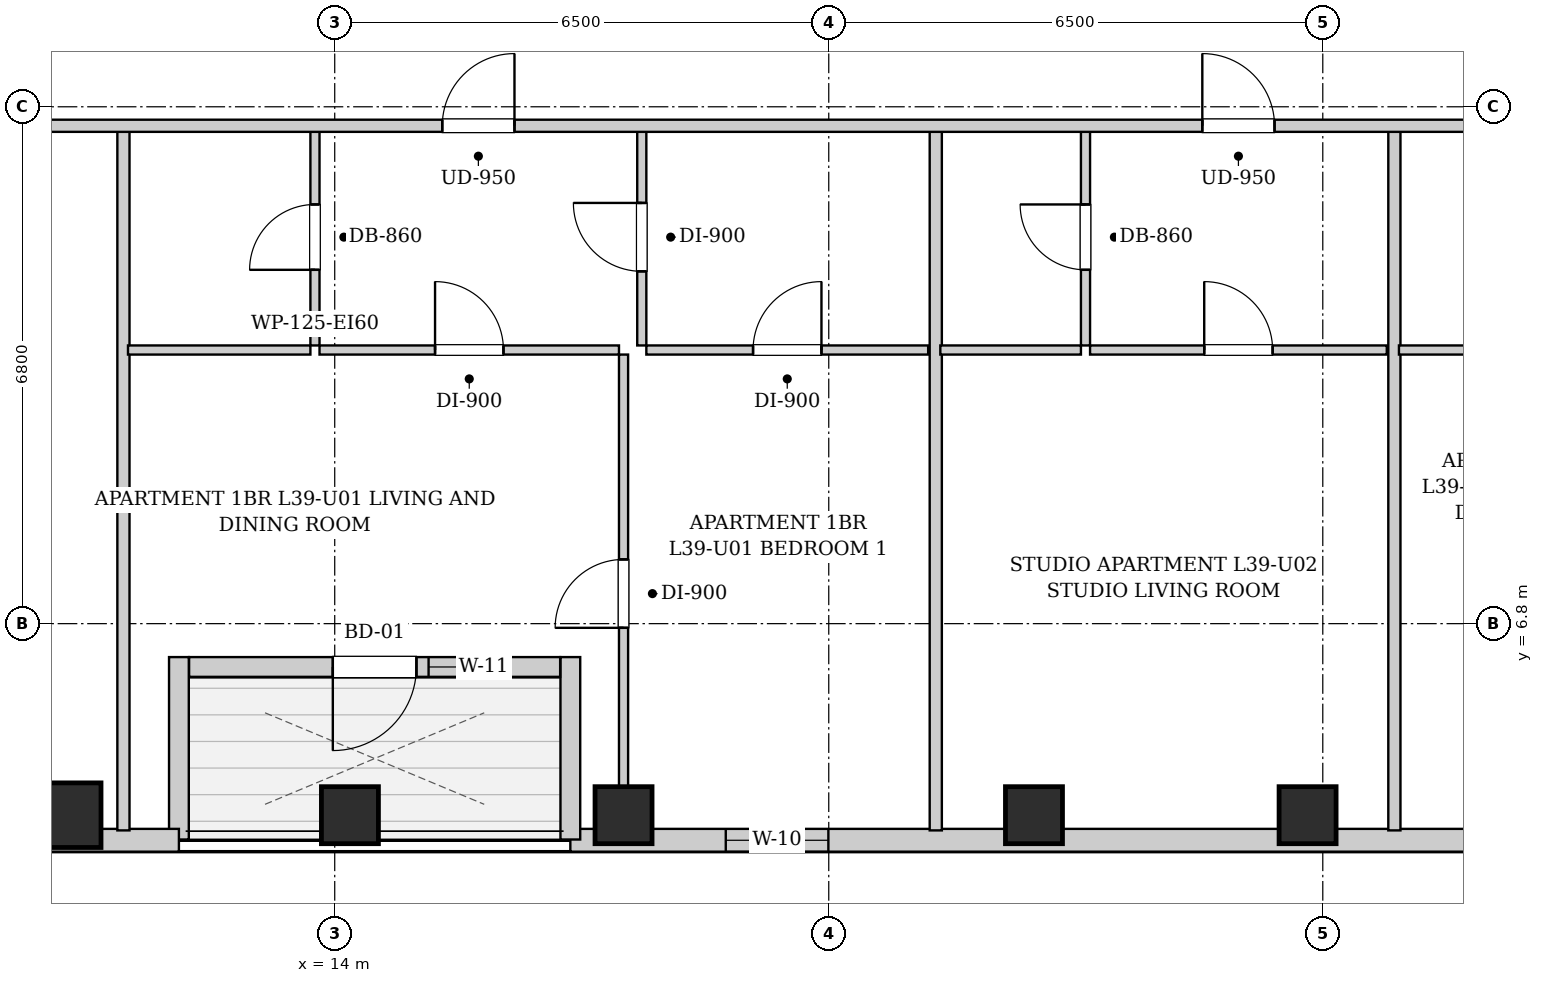
"""IFC4 building model, lengths in metres.
Left out: names, types, materials, properties, quantities, classifications, styles, units other than length and angle.
Written with IfcOpenShell. Run it as: python <this file> out.ifc"""

import sys

from ifc_helpers import new_model, si_unit, direction, frame, frame_2d, origin, origin_2d, place, context, subcontext, project, spatial, rectangle, extrude, element, fill, save


model = new_model("IFC4")
c1 = context("Model", 3, precision=1e-05, world=origin(), true_north=direction((0.0, 1.0)))
c2 = subcontext(c1, "Body", "Model", "MODEL_VIEW")
j1 = project(units=[si_unit("LENGTHUNIT", "METRE"), si_unit("PLANEANGLEUNIT", "RADIAN")], contexts=[c1])
p1 = place(None, origin())
s1 = spatial("IfcSite", under=j1, at=p1, CompositionType="ELEMENT")
p2 = place(p1, origin())
s2 = spatial("IfcBuilding", under=s1, at=p2, CompositionType="ELEMENT")
p3 = place(p2, frame((0.0, 0.0, 137.4)))
s3 = spatial("IfcBuildingStorey", under=s2, at=p3, CompositionType="ELEMENT", Elevation=137.4)
p4 = place(p3, frame((10.5, 4.28, 0.0), z_axis=(0.0, 0.0, 1.0), x_axis=(1.0, 0.0, 0.0)))
e1 = element("IfcColumn", 1, at=p4, inside=s3, PredefinedType="COLUMN", context=c2, shape_type="SweptSolid", body=[
    extrude(rectangle(XDim=0.85, YDim=0.85, at=origin_2d()), origin(), (0.0, 0.0, 1.0), 3.25),
])
for number, where, z_axis, x_axis in (
    (2, (14.2, 4.28, 0.0), (0.0, 0.0, 1.0), (1.0, 0.0, 0.0)),
    (3, (17.8, 4.28, 0.0), (0.0, 0.0, 1.0), (1.0, 0.0, 0.0)),
    (4, (23.2, 4.28, 0.0), (0.0, 0.0, 1.0), (1.0, 0.0, 0.0)),
    (5, (26.8, 4.28, 0.0), (0.0, 0.0, 1.0), (1.0, 0.0, 0.0)),
):
    element("IfcColumn", number, at=place(p3, frame(where, z_axis=z_axis, x_axis=x_axis)), inside=s3, PredefinedType="COLUMN", context=c2, shape_type="SweptSolid", body=[
        extrude(rectangle(XDim=0.75, YDim=0.75, at=origin_2d()), origin(), (0.0, 0.0, 1.0), 3.25),
    ])
p5 = place(p3, frame((37.8, 3.95, 0.0), z_axis=(0.0, 0.0, 1.0), x_axis=(-1.0, 0.0, 0.0)))
e6 = element("IfcWall", 6, at=p5, inside=s3, PredefinedType="SOLIDWALL", context=c2, shape_type="SweptSolid", body=[
    extrude(rectangle(XDim=20.7, YDim=0.3, at=frame_2d((10.35, 0.0))), origin(), (0.0, 0.0, 1.0), 2.99),
])
p6 = place(p5, frame((17.305, 0.0, 0.55)))
e7 = element("IfcOpeningElement", 7, at=p6, cuts=e6, PredefinedType="OPENING", context=c2, shape_type="SweptSolid", body=[
    extrude(rectangle(XDim=1.35, YDim=1.2, at=frame_2d((0.675, 0.6))), frame((0.0, 0.16, 0.0), z_axis=(0.0, -1.0, 0.0), x_axis=(1.0, 0.0, 0.0)), (0.0, 0.0, 1.0), 0.32),
])
p7 = place(p5, frame((7.106, 0.0, 0.55)))
e8 = element("IfcOpeningElement", 8, at=p7, cuts=e6, PredefinedType="OPENING", context=c2, shape_type="SweptSolid", body=[
    extrude(rectangle(XDim=1.35, YDim=1.2, at=frame_2d((0.675, 0.6))), frame((0.0, 0.16, 0.0), z_axis=(0.0, -1.0, 0.0), x_axis=(1.0, 0.0, 0.0)), (0.0, 0.0, 1.0), 0.32),
])
p8 = place(p5, frame((2.715, 0.0, 0.55)))
e9 = element("IfcOpeningElement", 9, at=p8, cuts=e6, PredefinedType="OPENING", context=c2, shape_type="SweptSolid", body=[
    extrude(rectangle(XDim=1.35, YDim=1.2, at=frame_2d((0.675, 0.6))), frame((0.0, 0.16, 0.0), z_axis=(0.0, -1.0, 0.0), x_axis=(1.0, 0.0, 0.0)), (0.0, 0.0, 1.0), 0.32),
])
p9 = place(p3, frame((17.1, 3.96, 0.0), z_axis=(0.0, 0.0, 1.0), x_axis=(0.0, 1.0, 0.0)))
e10 = element("IfcWall", 10, at=p9, inside=s3, PredefinedType="SOLIDWALL", context=c2, shape_type="SweptSolid", body=[
    extrude(rectangle(XDim=2.4, YDim=0.26, at=frame_2d((1.2, 0.0))), origin(), (0.0, 0.0, 1.0), 2.99),
])
p10 = place(p3, frame((16.966, 6.23, 0.0), z_axis=(0.0, 0.0, 1.0), x_axis=(-1.0, 0.0, 0.0)))
e11 = element("IfcWall", 11, at=p10, inside=s3, PredefinedType="SOLIDWALL", context=c2, shape_type="SweptSolid", body=[
    extrude(rectangle(XDim=4.882, YDim=0.26, at=frame_2d((2.441, 0.0))), origin(), (0.0, 0.0, 1.0), 2.99),
])
p11 = place(p10, frame((1.891, 0.0, 0.0)))
e12 = element("IfcOpeningElement", 12, at=p11, cuts=e11, PredefinedType="OPENING", context=c2, shape_type="SweptSolid", body=[
    extrude(rectangle(XDim=1.1, YDim=2.0, at=frame_2d((0.55, 1.0))), frame((0.0, 0.14, 0.0), z_axis=(0.0, -1.0, 0.0), x_axis=(1.0, 0.0, 0.0)), (0.0, 0.0, 1.0), 0.28),
])
p12 = place(p10, frame((0.881, 0.0, 0.55)))
e13 = element("IfcOpeningElement", 13, at=p12, cuts=e11, PredefinedType="OPENING", context=c2, shape_type="SweptSolid", body=[
    extrude(rectangle(XDim=0.85, YDim=1.2, at=frame_2d((0.425, 0.6))), frame((0.0, 0.14, 0.0), z_axis=(0.0, -1.0, 0.0), x_axis=(1.0, 0.0, 0.0)), (0.0, 0.0, 1.0), 0.28),
])
p13 = place(p3, frame((11.95, 6.36, 0.0), z_axis=(0.0, 0.0, 1.0), x_axis=(0.0, -1.0, 0.0)))
e14 = element("IfcWall", 14, at=p13, inside=s3, PredefinedType="SOLIDWALL", context=c2, shape_type="SweptSolid", body=[
    extrude(rectangle(XDim=2.4, YDim=0.26, at=frame_2d((1.2, 0.0))), origin(), (0.0, 0.0, 1.0), 2.99),
])
p14 = place(p3, frame((11.95, 3.95, 0.0), z_axis=(0.0, 0.0, 1.0), x_axis=(-1.0, 0.0, 0.0)))
e15 = element("IfcWall", 15, at=p14, inside=s3, PredefinedType="SOLIDWALL", context=c2, shape_type="SweptSolid", body=[
    extrude(rectangle(XDim=1.95, YDim=0.3, at=frame_2d((0.975, 0.0))), origin(), (0.0, 0.0, 1.0), 2.99),
])
p15 = place(p3, frame((11.22, 4.08, 0.0), z_axis=(0.0, 0.0, 1.0), x_axis=(0.0, 1.0, 0.0)))
e16 = element("IfcWall", 16, at=p15, inside=s3, PredefinedType="PARTITIONING", context=c2, shape_type="SweptSolid", body=[
    extrude(rectangle(XDim=9.23, YDim=0.16, at=frame_2d((4.615, 0.0))), origin(), (0.0, 0.0, 1.0), 2.99),
])
p16 = place(p3, frame((13.74, 10.46, 0.0), z_axis=(0.0, 0.0, 1.0), x_axis=(0.0, 1.0, 0.0)))
e17 = element("IfcWall", 17, at=p16, inside=s3, PredefinedType="PARTITIONING", context=c2, shape_type="SweptSolid", body=[
    extrude(rectangle(XDim=2.85, YDim=0.12, at=frame_2d((1.425, 0.0))), origin(), (0.0, 0.0, 1.0), 2.99),
])
p17 = place(p16, frame((0.995, 0.0, 0.0)))
e18 = element("IfcOpeningElement", 18, at=p17, cuts=e17, PredefinedType="OPENING", context=c2, shape_type="SweptSolid", body=[
    extrude(rectangle(XDim=0.86, YDim=2.05, at=frame_2d((0.43, 1.025))), frame((0.0, 0.07, 0.0), z_axis=(0.0, -1.0, 0.0), x_axis=(1.0, 0.0, 0.0)), (0.0, 0.0, 1.0), 0.14),
])
p18 = place(p3, frame((11.28, 10.4, 0.0), z_axis=(0.0, 0.0, 1.0), x_axis=(1.0, 0.0, 0.0)))
e19 = element("IfcWall", 19, at=p18, inside=s3, PredefinedType="PARTITIONING", context=c2, shape_type="SweptSolid", body=[
    extrude(rectangle(XDim=2.4, YDim=0.12, at=frame_2d((1.2, 0.0))), origin(), (0.0, 0.0, 1.0), 2.99),
])
p19 = place(p3, frame((18.04, 10.46, 0.0), z_axis=(0.0, 0.0, 1.0), x_axis=(0.0, 1.0, 0.0)))
e20 = element("IfcWall", 20, at=p19, inside=s3, PredefinedType="PARTITIONING", context=c2, shape_type="SweptSolid", body=[
    extrude(rectangle(XDim=2.85, YDim=0.12, at=frame_2d((1.425, 0.0))), origin(), (0.0, 0.0, 1.0), 2.99),
])
p20 = place(p19, frame((0.975, 0.0, 0.0)))
e21 = element("IfcOpeningElement", 21, at=p20, cuts=e20, PredefinedType="OPENING", context=c2, shape_type="SweptSolid", body=[
    extrude(rectangle(XDim=0.9, YDim=2.05, at=frame_2d((0.45, 1.025))), frame((0.0, 0.07, 0.0), z_axis=(0.0, -1.0, 0.0), x_axis=(1.0, 0.0, 0.0)), (0.0, 0.0, 1.0), 0.14),
])
p21 = place(p3, frame((13.8, 10.4, 0.0), z_axis=(0.0, 0.0, 1.0), x_axis=(1.0, 0.0, 0.0)))
e22 = element("IfcWall", 22, at=p21, inside=s3, PredefinedType="PARTITIONING", context=c2, shape_type="SweptSolid", body=[
    extrude(rectangle(XDim=3.94, YDim=0.12, at=frame_2d((1.97, 0.0))), origin(), (0.0, 0.0, 1.0), 2.99),
])
p22 = place(p21, frame((1.52, 0.0, 0.0)))
e23 = element("IfcOpeningElement", 23, at=p22, cuts=e22, PredefinedType="OPENING", context=c2, shape_type="SweptSolid", body=[
    extrude(rectangle(XDim=0.9, YDim=2.05, at=frame_2d((0.45, 1.025))), frame((0.0, 0.07, 0.0), z_axis=(0.0, -1.0, 0.0), x_axis=(1.0, 0.0, 0.0)), (0.0, 0.0, 1.0), 0.14),
])
p23 = place(p3, frame((18.1, 10.4, 0.0), z_axis=(0.0, 0.0, 1.0), x_axis=(1.0, 0.0, 0.0)))
e24 = element("IfcWall", 24, at=p23, inside=s3, PredefinedType="PARTITIONING", context=c2, shape_type="SweptSolid", body=[
    extrude(rectangle(XDim=3.708, YDim=0.12, at=frame_2d((1.854, 0.0))), origin(), (0.0, 0.0, 1.0), 2.99),
])
p24 = place(p23, frame((1.404, 0.0, 0.0)))
e25 = element("IfcOpeningElement", 25, at=p24, cuts=e24, PredefinedType="OPENING", context=c2, shape_type="SweptSolid", body=[
    extrude(rectangle(XDim=0.9, YDim=2.05, at=frame_2d((0.45, 1.025))), frame((0.0, 0.07, 0.0), z_axis=(0.0, -1.0, 0.0), x_axis=(1.0, 0.0, 0.0)), (0.0, 0.0, 1.0), 0.14),
])
p25 = place(p3, frame((17.8, 4.08, 0.0), z_axis=(0.0, 0.0, 1.0), x_axis=(0.0, 1.0, 0.0)))
e26 = element("IfcWall", 26, at=p25, inside=s3, PredefinedType="PARTITIONING", context=c2, shape_type="SweptSolid", body=[
    extrude(rectangle(XDim=6.26, YDim=0.12, at=frame_2d((3.13, 0.0))), origin(), (0.0, 0.0, 1.0), 2.426),
])
p26 = place(p25, frame((2.665, 0.0, 0.0)))
e27 = element("IfcOpeningElement", 27, at=p26, cuts=e26, PredefinedType="OPENING", context=c2, shape_type="SweptSolid", body=[
    extrude(rectangle(XDim=0.9, YDim=2.05, at=frame_2d((0.45, 1.025))), frame((0.0, 0.07, 0.0), z_axis=(0.0, -1.0, 0.0), x_axis=(1.0, 0.0, 0.0)), (0.0, 0.0, 1.0), 0.14),
])
p27 = place(p3, frame((21.908, 4.08, 0.0), z_axis=(0.0, 0.0, 1.0), x_axis=(0.0, 1.0, 0.0)))
e28 = element("IfcWall", 28, at=p27, inside=s3, PredefinedType="PARTITIONING", context=c2, shape_type="SweptSolid", body=[
    extrude(rectangle(XDim=9.23, YDim=0.16, at=frame_2d((4.615, 0.0))), origin(), (0.0, 0.0, 1.0), 2.99),
])
p28 = place(p3, frame((23.878, 10.46, 0.0), z_axis=(0.0, 0.0, 1.0), x_axis=(0.0, 1.0, 0.0)))
e29 = element("IfcWall", 29, at=p28, inside=s3, PredefinedType="PARTITIONING", context=c2, shape_type="SweptSolid", body=[
    extrude(rectangle(XDim=2.85, YDim=0.12, at=frame_2d((1.425, 0.0))), origin(), (0.0, 0.0, 1.0), 2.99),
])
p29 = place(p28, frame((0.995, 0.0, 0.0)))
e30 = element("IfcOpeningElement", 30, at=p29, cuts=e29, PredefinedType="OPENING", context=c2, shape_type="SweptSolid", body=[
    extrude(rectangle(XDim=0.86, YDim=2.05, at=frame_2d((0.43, 1.025))), frame((0.0, 0.07, 0.0), z_axis=(0.0, -1.0, 0.0), x_axis=(1.0, 0.0, 0.0)), (0.0, 0.0, 1.0), 0.14),
])
p30 = place(p3, frame((21.968, 10.4, 0.0), z_axis=(0.0, 0.0, 1.0), x_axis=(1.0, 0.0, 0.0)))
e31 = element("IfcWall", 31, at=p30, inside=s3, PredefinedType="PARTITIONING", context=c2, shape_type="SweptSolid", body=[
    extrude(rectangle(XDim=1.85, YDim=0.12, at=frame_2d((0.925, 0.0))), origin(), (0.0, 0.0, 1.0), 2.99),
])
p31 = place(p3, frame((23.938, 10.4, 0.0), z_axis=(0.0, 0.0, 1.0), x_axis=(1.0, 0.0, 0.0)))
e32 = element("IfcWall", 32, at=p31, inside=s3, PredefinedType="PARTITIONING", context=c2, shape_type="SweptSolid", body=[
    extrude(rectangle(XDim=3.904, YDim=0.12, at=frame_2d((1.952, 0.0))), origin(), (0.0, 0.0, 1.0), 2.99),
])
p32 = place(p31, frame((1.502, 0.0, 0.0)))
e33 = element("IfcOpeningElement", 33, at=p32, cuts=e32, PredefinedType="OPENING", context=c2, shape_type="SweptSolid", body=[
    extrude(rectangle(XDim=0.9, YDim=2.05, at=frame_2d((0.45, 1.025))), frame((0.0, 0.07, 0.0), z_axis=(0.0, -1.0, 0.0), x_axis=(1.0, 0.0, 0.0)), (0.0, 0.0, 1.0), 0.14),
])
p33 = place(p3, frame((27.942, 4.08, 0.0), z_axis=(0.0, 0.0, 1.0), x_axis=(0.0, 1.0, 0.0)))
e34 = element("IfcWall", 34, at=p33, inside=s3, PredefinedType="PARTITIONING", context=c2, shape_type="SweptSolid", body=[
    extrude(rectangle(XDim=9.23, YDim=0.16, at=frame_2d((4.615, 0.0))), origin(), (0.0, 0.0, 1.0), 2.99),
])
p34 = place(p3, frame((28.002, 10.4, 0.0), z_axis=(0.0, 0.0, 1.0), x_axis=(1.0, 0.0, 0.0)))
e35 = element("IfcWall", 35, at=p34, inside=s3, PredefinedType="PARTITIONING", context=c2, shape_type="SweptSolid", body=[
    extrude(rectangle(XDim=2.4, YDim=0.12, at=frame_2d((1.2, 0.0))), origin(), (0.0, 0.0, 1.0), 2.99),
])
p35 = place(p3, frame((10.05, 13.35, 0.0), z_axis=(0.0, 0.0, 1.0), x_axis=(1.0, 0.0, 0.0)))
e36 = element("IfcWall", 36, at=p35, inside=s3, PredefinedType="PARTITIONING", context=c2, shape_type="SweptSolid", body=[
    extrude(rectangle(XDim=27.7, YDim=0.16, at=frame_2d((13.85, 0.0))), origin(), (0.0, 0.0, 1.0), 2.99),
])
p36 = place(p35, frame((5.365, 0.0, 0.0)))
e37 = element("IfcOpeningElement", 37, at=p36, cuts=e36, PredefinedType="OPENING", context=c2, shape_type="SweptSolid", body=[
    extrude(rectangle(XDim=0.95, YDim=2.1, at=frame_2d((0.475, 1.05))), frame((0.0, 0.09, 0.0), z_axis=(0.0, -1.0, 0.0), x_axis=(1.0, 0.0, 0.0)), (0.0, 0.0, 1.0), 0.18),
])
p37 = place(p35, frame((15.365, 0.0, 0.0)))
e38 = element("IfcOpeningElement", 38, at=p37, cuts=e36, PredefinedType="OPENING", context=c2, shape_type="SweptSolid", body=[
    extrude(rectangle(XDim=0.95, YDim=2.1, at=frame_2d((0.475, 1.05))), frame((0.0, 0.09, 0.0), z_axis=(0.0, -1.0, 0.0), x_axis=(1.0, 0.0, 0.0)), (0.0, 0.0, 1.0), 0.18),
])
p38 = place(p35, frame((21.565, 0.0, 0.0)))
e39 = element("IfcOpeningElement", 39, at=p38, cuts=e36, PredefinedType="OPENING", context=c2, shape_type="SweptSolid", body=[
    extrude(rectangle(XDim=0.95, YDim=2.1, at=frame_2d((0.475, 1.05))), frame((0.0, 0.09, 0.0), z_axis=(0.0, -1.0, 0.0), x_axis=(1.0, 0.0, 0.0)), (0.0, 0.0, 1.0), 0.18),
])
p39 = place(p17, origin())
e40 = element("IfcDoor", 40, at=p39, inside=s3, OperationType="SINGLE_SWING_LEFT", PredefinedType="DOOR", context=c2, shape_type="SweptSolid", body=[
    extrude(rectangle(XDim=0.86, YDim=2.05, at=frame_2d((0.43, 1.025))), frame((0.0, 0.025, 0.0), z_axis=(0.0, -1.0, 0.0), x_axis=(1.0, 0.0, 0.0)), (0.0, 0.0, 1.0), 0.05),
])
fill(e18, e40)
p40 = place(p20, origin())
e41 = element("IfcDoor", 41, at=p40, inside=s3, OperationType="SINGLE_SWING_RIGHT", PredefinedType="DOOR", context=c2, shape_type="SweptSolid", body=[
    extrude(rectangle(XDim=0.9, YDim=2.05, at=frame_2d((0.45, 1.025))), frame((0.0, 0.025, 0.0), z_axis=(0.0, -1.0, 0.0), x_axis=(1.0, 0.0, 0.0)), (0.0, 0.0, 1.0), 0.05),
])
fill(e21, e41)
p41 = place(p22, origin())
e42 = element("IfcDoor", 42, at=p41, inside=s3, OperationType="SINGLE_SWING_LEFT", PredefinedType="DOOR", context=c2, shape_type="SweptSolid", body=[
    extrude(rectangle(XDim=0.9, YDim=2.05, at=frame_2d((0.45, 1.025))), frame((0.0, 0.025, 0.0), z_axis=(0.0, -1.0, 0.0), x_axis=(1.0, 0.0, 0.0)), (0.0, 0.0, 1.0), 0.05),
])
fill(e23, e42)
p42 = place(p24, origin())
e43 = element("IfcDoor", 43, at=p42, inside=s3, OperationType="SINGLE_SWING_RIGHT", PredefinedType="DOOR", context=c2, shape_type="SweptSolid", body=[
    extrude(rectangle(XDim=0.9, YDim=2.05, at=frame_2d((0.45, 1.025))), frame((0.0, 0.025, 0.0), z_axis=(0.0, -1.0, 0.0), x_axis=(1.0, 0.0, 0.0)), (0.0, 0.0, 1.0), 0.05),
])
fill(e25, e43)
p43 = place(p26, origin())
e44 = element("IfcDoor", 44, at=p43, inside=s3, OperationType="SINGLE_SWING_LEFT", PredefinedType="DOOR", context=c2, shape_type="SweptSolid", body=[
    extrude(rectangle(XDim=0.9, YDim=2.05, at=frame_2d((0.45, 1.025))), frame((0.0, 0.025, 0.0), z_axis=(0.0, -1.0, 0.0), x_axis=(1.0, 0.0, 0.0)), (0.0, 0.0, 1.0), 0.05),
])
fill(e27, e44)
p44 = place(p29, origin())
e45 = element("IfcDoor", 45, at=p44, inside=s3, OperationType="SINGLE_SWING_RIGHT", PredefinedType="DOOR", context=c2, shape_type="SweptSolid", body=[
    extrude(rectangle(XDim=0.86, YDim=2.05, at=frame_2d((0.43, 1.025))), frame((0.0, 0.025, 0.0), z_axis=(0.0, -1.0, 0.0), x_axis=(1.0, 0.0, 0.0)), (0.0, 0.0, 1.0), 0.05),
])
fill(e30, e45)
p45 = place(p32, origin())
e46 = element("IfcDoor", 46, at=p45, inside=s3, OperationType="SINGLE_SWING_LEFT", PredefinedType="DOOR", context=c2, shape_type="SweptSolid", body=[
    extrude(rectangle(XDim=0.9, YDim=2.05, at=frame_2d((0.45, 1.025))), frame((0.0, 0.025, 0.0), z_axis=(0.0, -1.0, 0.0), x_axis=(1.0, 0.0, 0.0)), (0.0, 0.0, 1.0), 0.05),
])
fill(e33, e46)
p46 = place(p36, origin())
e47 = element("IfcDoor", 47, at=p46, inside=s3, OperationType="SINGLE_SWING_RIGHT", PredefinedType="DOOR", context=c2, shape_type="SweptSolid", body=[
    extrude(rectangle(XDim=0.95, YDim=2.1, at=frame_2d((0.475, 1.05))), frame((0.0, 0.025, 0.0), z_axis=(0.0, -1.0, 0.0), x_axis=(1.0, 0.0, 0.0)), (0.0, 0.0, 1.0), 0.05),
])
fill(e37, e47)
p47 = place(p37, origin())
e48 = element("IfcDoor", 48, at=p47, inside=s3, OperationType="SINGLE_SWING_LEFT", PredefinedType="DOOR", context=c2, shape_type="SweptSolid", body=[
    extrude(rectangle(XDim=0.95, YDim=2.1, at=frame_2d((0.475, 1.05))), frame((0.0, 0.025, 0.0), z_axis=(0.0, -1.0, 0.0), x_axis=(1.0, 0.0, 0.0)), (0.0, 0.0, 1.0), 0.05),
])
fill(e38, e48)
p48 = place(p11, origin())
e49 = element("IfcDoor", 49, at=p48, inside=s3, OperationType="SINGLE_SWING_RIGHT", PredefinedType="DOOR", context=c2, shape_type="SweptSolid", body=[
    extrude(rectangle(XDim=1.1, YDim=2.0, at=frame_2d((0.55, 1.0))), frame((0.0, 0.025, 0.0), z_axis=(0.0, -1.0, 0.0), x_axis=(1.0, 0.0, 0.0)), (0.0, 0.0, 1.0), 0.05),
])
fill(e12, e49)
p49 = place(p12, origin())
e50 = element("IfcWindow", 50, at=p49, inside=s3, PartitioningType="SINGLE_PANEL", PredefinedType="WINDOW", context=c2, shape_type="SweptSolid", body=[
    extrude(rectangle(XDim=0.85, YDim=1.2, at=frame_2d((0.425, 0.6))), frame((0.0, 0.03, 0.0), z_axis=(0.0, -1.0, 0.0), x_axis=(1.0, 0.0, 0.0)), (0.0, 0.0, 1.0), 0.06),
])
fill(e13, e50)
p50 = place(p6, origin())
e51 = element("IfcWindow", 51, at=p50, inside=s3, PartitioningType="SINGLE_PANEL", PredefinedType="WINDOW", context=c2, shape_type="SweptSolid", body=[
    extrude(rectangle(XDim=1.35, YDim=1.2, at=frame_2d((0.675, 0.6))), frame((0.0, 0.03, 0.0), z_axis=(0.0, -1.0, 0.0), x_axis=(1.0, 0.0, 0.0)), (0.0, 0.0, 1.0), 0.06),
])
fill(e7, e51)
save(model, sys.argv[1])
